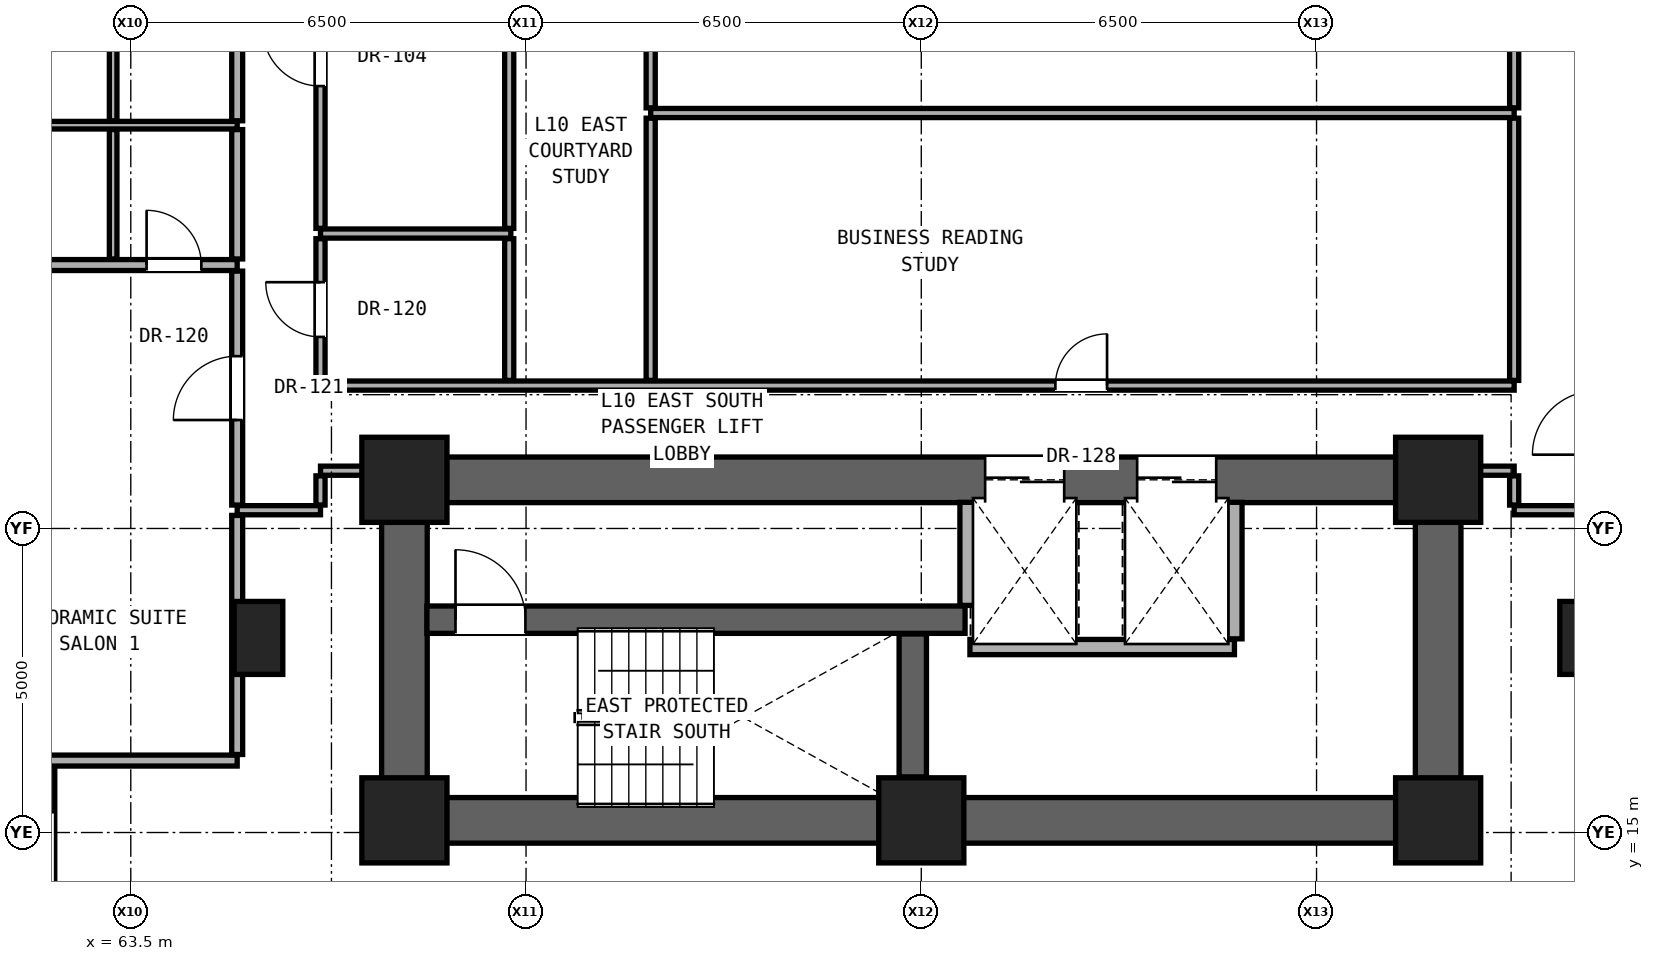
"""IFC4 building model, lengths in metres.
Left out: names, types, materials, properties, quantities, classifications, styles, units other than length and angle.
Written with IfcOpenShell. Run it as: python <this file> out.ifc"""

import sys

from ifc_helpers import new_model, si_unit, direction, frame, frame_2d, origin, origin_2d, place, context, subcontext, project, spatial, rectangle, extrude, element, fill, save


model = new_model("IFC4")
c1 = context("Model", 3, precision=1e-05, world=origin(), true_north=direction((0.0, 1.0)))
c2 = subcontext(c1, "Body", "Model", "MODEL_VIEW")
j1 = project(units=[si_unit("LENGTHUNIT", "METRE"), si_unit("PLANEANGLEUNIT", "RADIAN")], contexts=[c1])
p1 = place(None, origin())
s1 = spatial("IfcSite", under=j1, at=p1, CompositionType="ELEMENT")
p2 = place(p1, origin())
s2 = spatial("IfcBuilding", under=s1, at=p2, CompositionType="ELEMENT")
p3 = place(p2, frame((0.0, 0.0, 38.9)))
s3 = spatial("IfcBuildingStorey", under=s2, at=p3, CompositionType="ELEMENT", Elevation=38.9)
for number, where, z_axis, x_axis in (
    (1, (68.0, 15.2, 0.0), (0.0, 0.0, 1.0), (1.0, 0.0, 0.0)),
    (2, (76.5, 15.2, 0.0), (0.0, 0.0, 1.0), (1.0, 0.0, 0.0)),
    (3, (85.0, 15.2, 0.0), (0.0, 0.0, 1.0), (1.0, 0.0, 0.0)),
    (4, (68.0, 20.8, 0.0), (0.0, 0.0, 1.0), (1.0, 0.0, 0.0)),
    (5, (85.0, 20.8, 0.0), (0.0, 0.0, 1.0), (1.0, 0.0, 0.0)),
):
    element("IfcColumn", number, at=place(p3, frame(where, z_axis=z_axis, x_axis=x_axis)), inside=s3, PredefinedType="COLUMN", context=c2, shape_type="SweptSolid", body=[
        extrude(rectangle(XDim=1.4, YDim=1.4, at=origin_2d()), origin(), (0.0, 0.0, 1.0), 3.3),
    ])
for number, where, z_axis, x_axis in (
    (6, (65.6, 18.2, 0.0), (0.0, 0.0, 1.0), (1.0, 0.0, 0.0)),
    (7, (87.4, 18.2, 0.0), (0.0, 0.0, 1.0), (1.0, 0.0, 0.0)),
):
    element("IfcColumn", number, at=place(p3, frame(where, z_axis=z_axis, x_axis=x_axis)), inside=s3, PredefinedType="PILASTER", context=c2, shape_type="SweptSolid", body=[
        extrude(rectangle(XDim=0.8, YDim=1.2, at=origin_2d()), origin(), (0.0, 0.0, 1.0), 3.3),
    ])
p4 = place(p3, frame((68.0, 15.2, 0.0), z_axis=(0.0, 0.0, 1.0), x_axis=(1.0, 0.0, 0.0)))
e8 = element("IfcWall", 8, at=p4, inside=s3, PredefinedType="SHEAR", context=c2, shape_type="SweptSolid", body=[
    extrude(rectangle(XDim=17.0, YDim=0.75, at=frame_2d((8.5, 0.0))), origin(), (0.0, 0.0, 1.0), 3.06),
])
for number, where, z_axis, x_axis in (
    (9, (68.0, 15.2, 0.0), (0.0, 0.0, 1.0), (0.0, 1.0, 0.0)),
    (10, (85.0, 15.2, 0.0), (0.0, 0.0, 1.0), (0.0, 1.0, 0.0)),
):
    element("IfcWall", number, at=place(p3, frame(where, z_axis=z_axis, x_axis=x_axis)), inside=s3, PredefinedType="SHEAR", context=c2, shape_type="SweptSolid", body=[
        extrude(rectangle(XDim=5.6, YDim=0.75, at=frame_2d((2.8, 0.0))), origin(), (0.0, 0.0, 1.0), 3.06),
    ])
p5 = place(p3, frame((68.0, 20.8, 0.0), z_axis=(0.0, 0.0, 1.0), x_axis=(1.0, 0.0, 0.0)))
e11 = element("IfcWall", 11, at=p5, inside=s3, PredefinedType="SHEAR", context=c2, shape_type="SweptSolid", body=[
    extrude(rectangle(XDim=17.0, YDim=0.75, at=frame_2d((8.5, 0.0))), origin(), (0.0, 0.0, 1.0), 3.06),
])
p6 = place(p5, frame((9.55, 0.0, 0.0)))
e12 = element("IfcOpeningElement", 12, at=p6, cuts=e11, PredefinedType="OPENING", context=c2, shape_type="SweptSolid", body=[
    extrude(rectangle(XDim=1.3, YDim=2.3, at=frame_2d((0.65, 1.15))), frame((0.0, 0.385, 0.0), z_axis=(0.0, -1.0, 0.0), x_axis=(1.0, 0.0, 0.0)), (0.0, 0.0, 1.0), 0.77),
])
p7 = place(p5, frame((12.05, 0.0, 0.0)))
e13 = element("IfcOpeningElement", 13, at=p7, cuts=e11, PredefinedType="OPENING", context=c2, shape_type="SweptSolid", body=[
    extrude(rectangle(XDim=1.3, YDim=2.3, at=frame_2d((0.65, 1.15))), frame((0.0, 0.385, 0.0), z_axis=(0.0, -1.0, 0.0), x_axis=(1.0, 0.0, 0.0)), (0.0, 0.0, 1.0), 0.77),
])
p8 = place(p3, frame((62.11, 16.184, 0.0), z_axis=(0.0, 0.0, 1.0), x_axis=(0.0, -1.0, 0.0)))
e14 = element("IfcWall", 14, at=p8, inside=s3, PredefinedType="SOLIDWALL", context=c2, shape_type="SweptSolid", body=[
    extrude(rectangle(XDim=4.58, YDim=0.28, at=frame_2d((2.29, 0.0))), origin(), (0.0, 0.0, 1.0), 3.04),
])
p9 = place(p8, frame((0.85, 0.0, 0.79)))
e15 = element("IfcOpeningElement", 15, at=p9, cuts=e14, PredefinedType="OPENING", context=c2, shape_type="SweptSolid", body=[
    extrude(rectangle(XDim=1.5, YDim=2.1, at=frame_2d((0.75, 1.05))), frame((0.0, 0.15, 0.0), z_axis=(0.0, -1.0, 0.0), x_axis=(1.0, 0.0, 0.0)), (0.0, 0.0, 1.0), 0.3),
])
p10 = place(p3, frame((62.13, 16.183, 0.0), z_axis=(0.0, 0.0, 1.0), x_axis=(1.0, 0.0, 0.0)))
e16 = element("IfcWall", 16, at=p10, inside=s3, PredefinedType="PARTITIONING", context=c2, shape_type="SweptSolid", body=[
    extrude(rectangle(XDim=3.12, YDim=0.18, at=frame_2d((1.56, 0.0))), origin(), (0.0, 0.0, 1.0), 3.06),
])
p11 = place(p3, frame((77.3, 18.05, 0.0), z_axis=(0.0, 0.0, 1.0), x_axis=(1.0, 0.0, 0.0)))
e17 = element("IfcWall", 17, at=p11, inside=s3, PredefinedType="SOLIDWALL", context=c2, shape_type="SweptSolid", body=[
    extrude(rectangle(XDim=4.35, YDim=0.25, at=frame_2d((2.175, 0.0))), origin(), (0.0, 0.0, 1.0), 3.06),
])
p12 = place(p3, frame((68.37, 18.5, 0.0), z_axis=(0.0, 0.0, 1.0), x_axis=(1.0, 0.0, 0.0)))
e18 = element("IfcWall", 18, at=p12, inside=s3, PredefinedType="SHEAR", context=c2, shape_type="SweptSolid", body=[
    extrude(rectangle(XDim=8.85, YDim=0.45, at=frame_2d((4.425, 0.0))), origin(), (0.0, 0.0, 1.0), 3.06),
])
p13 = place(p12, frame((0.47, 0.0, 0.0)))
e19 = element("IfcOpeningElement", 19, at=p13, cuts=e18, PredefinedType="OPENING", context=c2, shape_type="SweptSolid", body=[
    extrude(rectangle(XDim=1.15, YDim=2.2, at=frame_2d((0.575, 1.1))), frame((0.0, 0.235, 0.0), z_axis=(0.0, -1.0, 0.0), x_axis=(1.0, 0.0, 0.0)), (0.0, 0.0, 1.0), 0.47),
])
p14 = place(p3, frame((65.25, 20.3, 0.0), z_axis=(0.0, 0.0, 1.0), x_axis=(1.0, 0.0, 0.0)))
e20 = element("IfcWall", 20, at=p14, inside=s3, PredefinedType="PARTITIONING", context=c2, shape_type="SweptSolid", body=[
    extrude(rectangle(XDim=1.37, YDim=0.15, at=frame_2d((0.685, 0.0))), origin(), (0.0, 0.0, 1.0), 3.06),
])
p15 = place(p3, frame((86.25, 20.3, 0.0), z_axis=(0.0, 0.0, 1.0), x_axis=(1.0, 0.0, 0.0)))
e21 = element("IfcWall", 21, at=p15, inside=s3, PredefinedType="PARTITIONING", context=c2, shape_type="SweptSolid", body=[
    extrude(rectangle(XDim=1.35, YDim=0.15, at=frame_2d((0.675, 0.0))), origin(), (0.0, 0.0, 1.0), 3.06),
])
p16 = place(p3, frame((66.62, 20.95, 0.0), z_axis=(0.0, 0.0, 1.0), x_axis=(1.0, 0.0, 0.0)))
e22 = element("IfcWall", 22, at=p16, inside=s3, PredefinedType="PARTITIONING", context=c2, shape_type="SweptSolid", body=[
    extrude(rectangle(XDim=1.01, YDim=0.15, at=frame_2d((0.505, 0.0))), origin(), (0.0, 0.0, 1.0), 2.452),
])
p17 = place(p3, frame((85.37, 20.95, 0.0), z_axis=(0.0, 0.0, 1.0), x_axis=(1.0, 0.0, 0.0)))
e23 = element("IfcWall", 23, at=p17, inside=s3, PredefinedType="PARTITIONING", context=c2, shape_type="SweptSolid", body=[
    extrude(rectangle(XDim=0.88, YDim=0.15, at=frame_2d((0.44, 0.0))), origin(), (0.0, 0.0, 1.0), 2.452),
])
p18 = place(p3, frame((66.62, 22.35, 0.0), z_axis=(0.0, 0.0, 1.0), x_axis=(1.0, 0.0, 0.0)))
e24 = element("IfcWall", 24, at=p18, inside=s3, PredefinedType="PARTITIONING", context=c2, shape_type="SweptSolid", body=[
    extrude(rectangle(XDim=19.63, YDim=0.15, at=frame_2d((9.815, 0.0))), origin(), (0.0, 0.0, 1.0), 2.125),
])
p19 = place(p18, frame((12.085, 0.0, 0.0)))
e25 = element("IfcOpeningElement", 25, at=p19, cuts=e24, PredefinedType="OPENING", context=c2, shape_type="SweptSolid", body=[
    extrude(rectangle(XDim=0.85, YDim=2.01, at=frame_2d((0.425, 1.005))), frame((0.0, 0.085, 0.0), z_axis=(0.0, -1.0, 0.0), x_axis=(1.0, 0.0, 0.0)), (0.0, 0.0, 1.0), 0.17),
])
p20 = place(p3, frame((57.53, 24.332, 0.0), z_axis=(0.0, 0.0, 1.0), x_axis=(1.0, 0.0, 0.0)))
e26 = element("IfcWall", 26, at=p20, inside=s3, PredefinedType="PARTITIONING", context=c2, shape_type="SweptSolid", body=[
    extrude(rectangle(XDim=7.72, YDim=0.18, at=frame_2d((3.86, 0.0))), origin(), (0.0, 0.0, 1.0), 2.196),
])
p21 = place(p20, frame((2.385, 0.0, 0.0)))
e27 = element("IfcOpeningElement", 27, at=p21, cuts=e26, PredefinedType="OPENING", context=c2, shape_type="SweptSolid", body=[
    extrude(rectangle(XDim=0.95, YDim=2.15, at=frame_2d((0.475, 1.075))), frame((0.0, 0.1, 0.0), z_axis=(0.0, -1.0, 0.0), x_axis=(1.0, 0.0, 0.0)), (0.0, 0.0, 1.0), 0.2),
])
p22 = place(p20, frame((6.23, 0.0, 0.0)))
e28 = element("IfcOpeningElement", 28, at=p22, cuts=e26, PredefinedType="OPENING", context=c2, shape_type="SweptSolid", body=[
    extrude(rectangle(XDim=0.9, YDim=2.1, at=frame_2d((0.45, 1.05))), frame((0.0, 0.1, 0.0), z_axis=(0.0, -1.0, 0.0), x_axis=(1.0, 0.0, 0.0)), (0.0, 0.0, 1.0), 0.2),
])
p23 = place(p3, frame((66.62, 24.85, 0.0), z_axis=(0.0, 0.0, 1.0), x_axis=(1.0, 0.0, 0.0)))
e29 = element("IfcWall", 29, at=p23, inside=s3, PredefinedType="PARTITIONING", context=c2, shape_type="SweptSolid", body=[
    extrude(rectangle(XDim=3.13, YDim=0.15, at=frame_2d((1.565, 0.0))), origin(), (0.0, 0.0, 1.0), 2.125),
])
p24 = place(p3, frame((57.53, 26.632, 0.0), z_axis=(0.0, 0.0, 1.0), x_axis=(1.0, 0.0, 0.0)))
e30 = element("IfcWall", 30, at=p24, inside=s3, PredefinedType="PARTITIONING", context=c2, shape_type="SweptSolid", body=[
    extrude(rectangle(XDim=7.72, YDim=0.125, at=frame_2d((3.86, 0.0))), origin(), (0.0, 0.0, 1.0), 2.196),
])
p25 = place(p3, frame((72.05, 26.832, 0.0), z_axis=(0.0, 0.0, 1.0), x_axis=(1.0, 0.0, 0.0)))
e31 = element("IfcWall", 31, at=p25, inside=s3, PredefinedType="PARTITIONING", context=c2, shape_type="SweptSolid", body=[
    extrude(rectangle(XDim=14.2, YDim=0.15, at=frame_2d((7.1, 0.0))), origin(), (0.0, 0.0, 1.0), 2.125),
])
p26 = place(p3, frame((63.21, 24.432, 0.0), z_axis=(0.0, 0.0, 1.0), x_axis=(0.0, 1.0, 0.0)))
e32 = element("IfcWall", 32, at=p26, inside=s3, PredefinedType="PARTITIONING", context=c2, shape_type="SweptSolid", body=[
    extrude(rectangle(XDim=2.128, YDim=0.125, at=frame_2d((1.064, 0.0))), origin(), (0.0, 0.0, 1.0), 3.06),
])
p27 = place(p3, frame((63.21, 26.705, 0.0), z_axis=(0.0, 0.0, 1.0), x_axis=(0.0, 1.0, 0.0)))
e33 = element("IfcWall", 33, at=p27, inside=s3, PredefinedType="PARTITIONING", context=c2, shape_type="SweptSolid", body=[
    extrude(rectangle(XDim=2.562, YDim=0.125, at=frame_2d((1.281, 0.0))), origin(), (0.0, 0.0, 1.0), 2.279),
])
p28 = place(p3, frame((65.25, 16.283, 0.0), z_axis=(0.0, 0.0, 1.0), x_axis=(0.0, 1.0, 0.0)))
e34 = element("IfcWall", 34, at=p28, inside=s3, PredefinedType="PARTITIONING", context=c2, shape_type="SweptSolid", body=[
    extrude(rectangle(XDim=3.932, YDim=0.18, at=frame_2d((1.966, 0.0))), origin(), (0.0, 0.0, 1.0), 2.436),
])
p29 = place(p3, frame((65.25, 20.385, 0.0), z_axis=(0.0, 0.0, 1.0), x_axis=(0.0, 1.0, 0.0)))
e35 = element("IfcWall", 35, at=p29, inside=s3, PredefinedType="PARTITIONING", context=c2, shape_type="SweptSolid", body=[
    extrude(rectangle(XDim=3.847, YDim=0.18, at=frame_2d((1.923, 0.0))), origin(), (0.0, 0.0, 1.0), 2.452),
])
p30 = place(p29, frame((1.398, 0.0, 0.0)))
e36 = element("IfcOpeningElement", 36, at=p30, cuts=e35, PredefinedType="OPENING", context=c2, shape_type="SweptSolid", body=[
    extrude(rectangle(XDim=1.05, YDim=2.2, at=frame_2d((0.525, 1.1))), frame((0.0, 0.1, 0.0), z_axis=(0.0, -1.0, 0.0), x_axis=(1.0, 0.0, 0.0)), (0.0, 0.0, 1.0), 0.2),
])
p31 = place(p3, frame((65.25, 24.432, 0.0), z_axis=(0.0, 0.0, 1.0), x_axis=(0.0, 1.0, 0.0)))
e37 = element("IfcWall", 37, at=p31, inside=s3, PredefinedType="PARTITIONING", context=c2, shape_type="SweptSolid", body=[
    extrude(rectangle(XDim=2.128, YDim=0.18, at=frame_2d((1.064, 0.0))), origin(), (0.0, 0.0, 1.0), 3.06),
])
p32 = place(p3, frame((65.25, 26.705, 0.0), z_axis=(0.0, 0.0, 1.0), x_axis=(0.0, 1.0, 0.0)))
e38 = element("IfcWall", 38, at=p32, inside=s3, PredefinedType="PARTITIONING", context=c2, shape_type="SweptSolid", body=[
    extrude(rectangle(XDim=2.562, YDim=0.18, at=frame_2d((1.281, 0.0))), origin(), (0.0, 0.0, 1.0), 2.279),
])
p33 = place(p3, frame((66.62, 20.385, 0.0), z_axis=(0.0, 0.0, 1.0), x_axis=(0.0, 1.0, 0.0)))
e39 = element("IfcWall", 39, at=p33, inside=s3, PredefinedType="PARTITIONING", context=c2, shape_type="SweptSolid", body=[
    extrude(rectangle(XDim=0.48, YDim=0.15, at=frame_2d((0.24, 0.0))), origin(), (0.0, 0.0, 1.0), 2.452),
])
p34 = place(p3, frame((66.62, 22.435, 0.0), z_axis=(0.0, 0.0, 1.0), x_axis=(0.0, 1.0, 0.0)))
e40 = element("IfcWall", 40, at=p34, inside=s3, PredefinedType="PARTITIONING", context=c2, shape_type="SweptSolid", body=[
    extrude(rectangle(XDim=2.33, YDim=0.15, at=frame_2d((1.165, 0.0))), origin(), (0.0, 0.0, 1.0), 3.06),
])
p35 = place(p34, frame((0.715, 0.0, 0.0)))
e41 = element("IfcOpeningElement", 41, at=p35, cuts=e40, PredefinedType="OPENING", context=c2, shape_type="SweptSolid", body=[
    extrude(rectangle(XDim=0.9, YDim=2.1, at=frame_2d((0.45, 1.05))), frame((0.0, 0.085, 0.0), z_axis=(0.0, -1.0, 0.0), x_axis=(1.0, 0.0, 0.0)), (0.0, 0.0, 1.0), 0.17),
])
p36 = place(p3, frame((66.62, 24.935, 0.0), z_axis=(0.0, 0.0, 1.0), x_axis=(0.0, 1.0, 0.0)))
e42 = element("IfcWall", 42, at=p36, inside=s3, PredefinedType="PARTITIONING", context=c2, shape_type="SweptSolid", body=[
    extrude(rectangle(XDim=5.63, YDim=0.15, at=frame_2d((2.815, 0.0))), origin(), (0.0, 0.0, 1.0), 2.279),
])
p37 = place(p36, frame((2.34, 0.0, 0.0)))
e43 = element("IfcOpeningElement", 43, at=p37, cuts=e42, PredefinedType="OPENING", context=c2, shape_type="SweptSolid", body=[
    extrude(rectangle(XDim=0.95, YDim=2.15, at=frame_2d((0.475, 1.075))), frame((0.0, 0.085, 0.0), z_axis=(0.0, -1.0, 0.0), x_axis=(1.0, 0.0, 0.0)), (0.0, 0.0, 1.0), 0.17),
])
p38 = place(p3, frame((69.723, 22.435, 0.0), z_axis=(0.0, 0.0, 1.0), x_axis=(0.0, 1.0, 0.0)))
e44 = element("IfcWall", 44, at=p38, inside=s3, PredefinedType="PARTITIONING", context=c2, shape_type="SweptSolid", body=[
    extrude(rectangle(XDim=2.33, YDim=0.15, at=frame_2d((1.165, 0.0))), origin(), (0.0, 0.0, 1.0), 3.06),
])
p39 = place(p3, frame((69.723, 24.935, 0.0), z_axis=(0.0, 0.0, 1.0), x_axis=(0.0, 1.0, 0.0)))
e45 = element("IfcWall", 45, at=p39, inside=s3, PredefinedType="PARTITIONING", context=c2, shape_type="SweptSolid", body=[
    extrude(rectangle(XDim=5.63, YDim=0.15, at=frame_2d((2.815, 0.0))), origin(), (0.0, 0.0, 1.0), 2.125),
])
p40 = place(p3, frame((72.05, 22.435, 0.0), z_axis=(0.0, 0.0, 1.0), x_axis=(0.0, 1.0, 0.0)))
e46 = element("IfcWall", 46, at=p40, inside=s3, PredefinedType="PARTITIONING", context=c2, shape_type="SweptSolid", body=[
    extrude(rectangle(XDim=4.312, YDim=0.15, at=frame_2d((2.156, 0.0))), origin(), (0.0, 0.0, 1.0), 2.589),
])
p41 = place(p3, frame((72.05, 26.917, 0.0), z_axis=(0.0, 0.0, 1.0), x_axis=(0.0, 1.0, 0.0)))
e47 = element("IfcWall", 47, at=p41, inside=s3, PredefinedType="PARTITIONING", context=c2, shape_type="SweptSolid", body=[
    extrude(rectangle(XDim=3.648, YDim=0.15, at=frame_2d((1.824, 0.0))), origin(), (0.0, 0.0, 1.0), 2.125),
])
p42 = place(p3, frame((76.36, 15.915, 0.0), z_axis=(0.0, 0.0, 1.0), x_axis=(0.0, 1.0, 0.0)))
e48 = element("IfcWall", 48, at=p42, inside=s3, PredefinedType="SHEAR", context=c2, shape_type="SweptSolid", body=[
    extrude(rectangle(XDim=2.35, YDim=0.45, at=frame_2d((1.175, 0.0))), origin(), (0.0, 0.0, 1.0), 3.06),
])
p43 = place(p3, frame((77.26, 18.735, 0.0), z_axis=(0.0, 0.0, 1.0), x_axis=(0.0, 1.0, 0.0)))
e49 = element("IfcWall", 49, at=p43, inside=s3, PredefinedType="SOLIDWALL", context=c2, shape_type="SweptSolid", body=[
    extrude(rectangle(XDim=1.695, YDim=0.25, at=frame_2d((0.847, 0.0))), origin(), (0.0, 0.0, 1.0), 3.06),
])
p44 = place(p3, frame((81.65, 18.185, 0.0), z_axis=(0.0, 0.0, 1.0), x_axis=(0.0, 1.0, 0.0)))
e50 = element("IfcWall", 50, at=p44, inside=s3, PredefinedType="SOLIDWALL", context=c2, shape_type="SweptSolid", body=[
    extrude(rectangle(XDim=2.245, YDim=0.25, at=frame_2d((1.123, 0.0))), origin(), (0.0, 0.0, 1.0), 3.06),
])
p45 = place(p3, frame((86.25, 20.385, 0.0), z_axis=(0.0, 0.0, 1.0), x_axis=(0.0, 1.0, 0.0)))
e51 = element("IfcWall", 51, at=p45, inside=s3, PredefinedType="PARTITIONING", context=c2, shape_type="SweptSolid", body=[
    extrude(rectangle(XDim=0.48, YDim=0.15, at=frame_2d((0.24, 0.0))), origin(), (0.0, 0.0, 1.0), 2.452),
])
p46 = place(p3, frame((86.25, 22.435, 0.0), z_axis=(0.0, 0.0, 1.0), x_axis=(0.0, 1.0, 0.0)))
e52 = element("IfcWall", 52, at=p46, inside=s3, PredefinedType="PARTITIONING", context=c2, shape_type="SweptSolid", body=[
    extrude(rectangle(XDim=4.312, YDim=0.15, at=frame_2d((2.156, 0.0))), origin(), (0.0, 0.0, 1.0), 3.06),
])
p47 = place(p3, frame((86.25, 26.917, 0.0), z_axis=(0.0, 0.0, 1.0), x_axis=(0.0, 1.0, 0.0)))
e53 = element("IfcWall", 53, at=p47, inside=s3, PredefinedType="PARTITIONING", context=c2, shape_type="SweptSolid", body=[
    extrude(rectangle(XDim=3.648, YDim=0.15, at=frame_2d((1.824, 0.0))), origin(), (0.0, 0.0, 1.0), 2.279),
])
p48 = place(p13, origin())
e54 = element("IfcDoor", 54, at=p48, inside=s3, OperationType="SINGLE_SWING_LEFT", PredefinedType="DOOR", context=c2, shape_type="SweptSolid", body=[
    extrude(rectangle(XDim=1.15, YDim=2.2, at=frame_2d((0.575, 1.1))), frame((0.0, 0.025, 0.0), z_axis=(0.0, -1.0, 0.0), x_axis=(1.0, 0.0, 0.0)), (0.0, 0.0, 1.0), 0.05),
])
fill(e19, e54)
p49 = place(p35, origin())
e55 = element("IfcDoor", 55, at=p49, inside=s3, OperationType="SINGLE_SWING_RIGHT", PredefinedType="DOOR", context=c2, shape_type="SweptSolid", body=[
    extrude(rectangle(XDim=0.9, YDim=2.1, at=frame_2d((0.45, 1.05))), frame((0.0, 0.025, 0.0), z_axis=(0.0, -1.0, 0.0), x_axis=(1.0, 0.0, 0.0)), (0.0, 0.0, 1.0), 0.05),
])
fill(e41, e55)
p50 = place(p30, origin())
e56 = element("IfcDoor", 56, at=p50, inside=s3, OperationType="SINGLE_SWING_LEFT", PredefinedType="DOOR", context=c2, shape_type="SweptSolid", body=[
    extrude(rectangle(XDim=1.05, YDim=2.2, at=frame_2d((0.525, 1.1))), frame((0.0, 0.025, 0.0), z_axis=(0.0, -1.0, 0.0), x_axis=(1.0, 0.0, 0.0)), (0.0, 0.0, 1.0), 0.05),
])
fill(e36, e56)
p51 = place(p22, origin())
e57 = element("IfcDoor", 57, at=p51, inside=s3, OperationType="SINGLE_SWING_LEFT", PredefinedType="DOOR", context=c2, shape_type="SweptSolid", body=[
    extrude(rectangle(XDim=0.9, YDim=2.1, at=frame_2d((0.45, 1.05))), frame((0.0, 0.025, 0.0), z_axis=(0.0, -1.0, 0.0), x_axis=(1.0, 0.0, 0.0)), (0.0, 0.0, 1.0), 0.05),
])
fill(e28, e57)
p52 = place(p37, origin())
e58 = element("IfcDoor", 58, at=p52, inside=s3, OperationType="SINGLE_SWING_RIGHT", PredefinedType="DOOR", context=c2, shape_type="SweptSolid", body=[
    extrude(rectangle(XDim=0.95, YDim=2.15, at=frame_2d((0.475, 1.075))), frame((0.0, 0.025, 0.0), z_axis=(0.0, -1.0, 0.0), x_axis=(1.0, 0.0, 0.0)), (0.0, 0.0, 1.0), 0.05),
])
fill(e43, e58)
p53 = place(p19, origin())
e59 = element("IfcDoor", 59, at=p53, inside=s3, OperationType="SINGLE_SWING_RIGHT", PredefinedType="DOOR", context=c2, shape_type="SweptSolid", body=[
    extrude(rectangle(XDim=0.85, YDim=2.01, at=frame_2d((0.425, 1.005))), frame((0.0, 0.025, 0.0), z_axis=(0.0, -1.0, 0.0), x_axis=(1.0, 0.0, 0.0)), (0.0, 0.0, 1.0), 0.05),
])
fill(e25, e59)
p54 = place(p6, origin())
e60 = element("IfcDoor", 60, at=p54, inside=s3, OperationType="DOUBLE_DOOR_SLIDING", PredefinedType="DOOR", context=c2, shape_type="SweptSolid", body=[
    extrude(rectangle(XDim=1.3, YDim=2.3, at=frame_2d((0.65, 1.15))), frame((0.0, 0.025, 0.0), z_axis=(0.0, -1.0, 0.0), x_axis=(1.0, 0.0, 0.0)), (0.0, 0.0, 1.0), 0.05),
])
fill(e12, e60)
p55 = place(p7, origin())
e61 = element("IfcDoor", 61, at=p55, inside=s3, OperationType="DOUBLE_DOOR_SLIDING", PredefinedType="DOOR", context=c2, shape_type="SweptSolid", body=[
    extrude(rectangle(XDim=1.3, YDim=2.3, at=frame_2d((0.65, 1.15))), frame((0.0, 0.025, 0.0), z_axis=(0.0, -1.0, 0.0), x_axis=(1.0, 0.0, 0.0)), (0.0, 0.0, 1.0), 0.05),
])
fill(e13, e61)
save(model, sys.argv[1])
